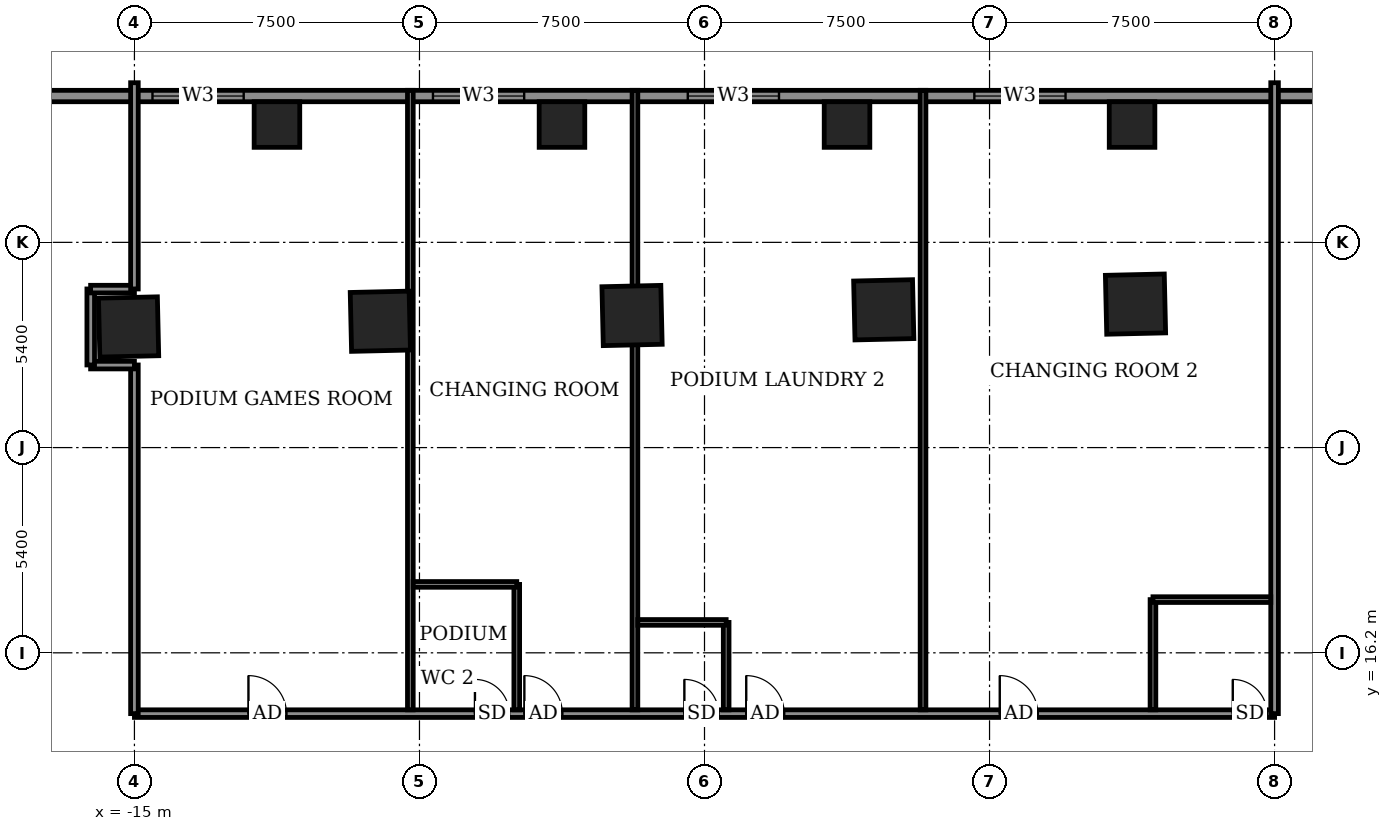
"""IFC4 building model, lengths in metres.
Left out: names, types, materials, properties, quantities, classifications, styles, units other than length and angle.
Written with IfcOpenShell. Run it as: python <this file> out.ifc"""

import sys

from ifc_helpers import new_model, si_unit, direction, frame, frame_2d, origin, origin_2d, place, context, subcontext, project, spatial, rectangle, extrude, element, fill, save


model = new_model("IFC4")
c1 = context("Model", 3, precision=1e-05, world=origin(), true_north=direction((0.0, 1.0)))
c2 = subcontext(c1, "Body", "Model", "MODEL_VIEW")
j1 = project(units=[si_unit("LENGTHUNIT", "METRE"), si_unit("PLANEANGLEUNIT", "RADIAN")], contexts=[c1])
p1 = place(None, origin())
s1 = spatial("IfcSite", under=j1, at=p1, CompositionType="ELEMENT")
p2 = place(p1, origin())
s2 = spatial("IfcBuilding", under=s1, at=p2, CompositionType="ELEMENT")
p3 = place(p2, frame((0.0, 0.0, 16.0)))
s3 = spatial("IfcBuildingStorey", under=s2, at=p3, CompositionType="ELEMENT", Elevation=16.0)
for number, where, z_axis, x_axis in (
    (1, (11.341, 25.375, -0.55), (0.0, 0.0, 1.0), (-1.0, -0.023, 0.0)),
    (2, (4.717, 25.225, -0.55), (0.0, 0.0, 1.0), (-1.0, -0.023, 0.0)),
    (3, (-1.906, 25.075, -0.55), (0.0, 0.0, 1.0), (-1.0, -0.023, 0.0)),
    (4, (-8.529, 24.924, -0.55), (0.0, 0.0, 1.0), (-1.0, -0.023, 0.0)),
    (5, (-15.154, 24.774, -0.55), (0.0, 0.0, 1.0), (-1.0, -0.023, 0.0)),
):
    element("IfcColumn", number, at=place(p3, frame(where, z_axis=z_axis, x_axis=x_axis)), inside=s3, PredefinedType="COLUMN", context=c2, shape_type="SweptSolid", body=[
        extrude(rectangle(XDim=1.55, YDim=1.55, at=origin_2d()), origin(), (0.0, 0.0, 1.0), 4.5),
    ])
for number, where, z_axis, x_axis in (
    (6, (-11.25, 30.1, -0.55), (0.0, 0.0, 1.0), (1.0, 0.0, 0.0)),
    (7, (-3.75, 30.1, -0.55), (0.0, 0.0, 1.0), (1.0, 0.0, 0.0)),
    (8, (3.75, 30.1, -0.55), (0.0, 0.0, 1.0), (1.0, 0.0, 0.0)),
    (9, (11.25, 30.1, -0.55), (0.0, 0.0, 1.0), (1.0, 0.0, 0.0)),
):
    element("IfcColumn", number, at=place(p3, frame(where, z_axis=z_axis, x_axis=x_axis)), inside=s3, PredefinedType="COLUMN", context=c2, shape_type="SweptSolid", body=[
        extrude(rectangle(XDim=1.2, YDim=1.2, at=origin_2d()), origin(), (0.0, 0.0, 1.0), 4.5),
    ])
p4 = place(p3, frame((28.138, 30.85, 0.0), z_axis=(0.0, 0.0, 1.0), x_axis=(-1.0, 0.0, 0.0)))
e10 = element("IfcWall", 10, at=p4, inside=s3, PredefinedType="SOLIDWALL", context=c2, shape_type="SweptSolid", body=[
    extrude(rectangle(XDim=56.276, YDim=0.3, at=frame_2d((28.138, 0.0))), origin(), (0.0, 0.0, 1.0), 3.95),
])
p5 = place(p4, frame((5.688, 0.0, 0.9)))
e11 = element("IfcOpeningElement", 11, at=p5, cuts=e10, PredefinedType="OPENING", context=c2, shape_type="SweptSolid", body=[
    extrude(rectangle(XDim=2.4, YDim=1.8, at=frame_2d((1.2, 0.9))), frame((0.0, 0.16, 0.0), z_axis=(0.0, -1.0, 0.0), x_axis=(1.0, 0.0, 0.0)), (0.0, 0.0, 1.0), 0.32),
])
p6 = place(p4, frame((18.638, 0.0, 0.9)))
e12 = element("IfcOpeningElement", 12, at=p6, cuts=e10, PredefinedType="OPENING", context=c2, shape_type="SweptSolid", body=[
    extrude(rectangle(XDim=2.4, YDim=1.8, at=frame_2d((1.2, 0.9))), frame((0.0, 0.16, 0.0), z_axis=(0.0, -1.0, 0.0), x_axis=(1.0, 0.0, 0.0)), (0.0, 0.0, 1.0), 0.32),
])
p7 = place(p4, frame((26.178, 0.0, 0.9)))
e13 = element("IfcOpeningElement", 13, at=p7, cuts=e10, PredefinedType="OPENING", context=c2, shape_type="SweptSolid", body=[
    extrude(rectangle(XDim=2.4, YDim=1.8, at=frame_2d((1.2, 0.9))), frame((0.0, 0.16, 0.0), z_axis=(0.0, -1.0, 0.0), x_axis=(1.0, 0.0, 0.0)), (0.0, 0.0, 1.0), 0.32),
])
p8 = place(p4, frame((32.883, 0.0, 0.9)))
e14 = element("IfcOpeningElement", 14, at=p8, cuts=e10, PredefinedType="OPENING", context=c2, shape_type="SweptSolid", body=[
    extrude(rectangle(XDim=2.4, YDim=1.8, at=frame_2d((1.2, 0.9))), frame((0.0, 0.16, 0.0), z_axis=(0.0, -1.0, 0.0), x_axis=(1.0, 0.0, 0.0)), (0.0, 0.0, 1.0), 0.32),
])
p9 = place(p4, frame((40.263, 0.0, 0.9)))
e15 = element("IfcOpeningElement", 15, at=p9, cuts=e10, PredefinedType="OPENING", context=c2, shape_type="SweptSolid", body=[
    extrude(rectangle(XDim=2.4, YDim=1.8, at=frame_2d((1.2, 0.9))), frame((0.0, 0.16, 0.0), z_axis=(0.0, -1.0, 0.0), x_axis=(1.0, 0.0, 0.0)), (0.0, 0.0, 1.0), 0.32),
])
p10 = place(p4, frame((53.488, 0.0, 0.9)))
e16 = element("IfcOpeningElement", 16, at=p10, cuts=e10, PredefinedType="OPENING", context=c2, shape_type="SweptSolid", body=[
    extrude(rectangle(XDim=2.4, YDim=1.8, at=frame_2d((1.2, 0.9))), frame((0.0, 0.16, 0.0), z_axis=(0.0, -1.0, 0.0), x_axis=(1.0, 0.0, 0.0)), (0.0, 0.0, 1.0), 0.32),
])
p11 = place(p3, frame((-15.0, 14.6, 0.0), z_axis=(0.0, 0.0, 1.0), x_axis=(1.0, 0.0, 0.0)))
e17 = element("IfcWall", 17, at=p11, inside=s3, PredefinedType="PARTITIONING", context=c2, shape_type="SweptSolid", body=[
    extrude(rectangle(XDim=30.0, YDim=0.2, at=frame_2d((15.0, 0.0))), origin(), (0.0, 0.0, 1.0), 3.95),
])
p12 = place(p11, frame((3.0, 0.0, 0.0)))
e18 = element("IfcOpeningElement", 18, at=p12, cuts=e17, PredefinedType="OPENING", context=c2, shape_type="SweptSolid", body=[
    extrude(rectangle(XDim=1.0, YDim=2.1, at=frame_2d((0.5, 1.05))), frame((0.0, 0.11, 0.0), z_axis=(0.0, -1.0, 0.0), x_axis=(1.0, 0.0, 0.0)), (0.0, 0.0, 1.0), 0.22),
])
p13 = place(p11, frame((10.26, 0.0, 0.0)))
e19 = element("IfcOpeningElement", 19, at=p13, cuts=e17, PredefinedType="OPENING", context=c2, shape_type="SweptSolid", body=[
    extrude(rectangle(XDim=1.0, YDim=2.1, at=frame_2d((0.5, 1.05))), frame((0.0, 0.11, 0.0), z_axis=(0.0, -1.0, 0.0), x_axis=(1.0, 0.0, 0.0)), (0.0, 0.0, 1.0), 0.22),
])
p14 = place(p11, frame((8.96, 0.0, 0.0)))
e20 = element("IfcOpeningElement", 20, at=p14, cuts=e17, PredefinedType="OPENING", context=c2, shape_type="SweptSolid", body=[
    extrude(rectangle(XDim=0.9, YDim=2.1, at=frame_2d((0.45, 1.05))), frame((0.0, 0.11, 0.0), z_axis=(0.0, -1.0, 0.0), x_axis=(1.0, 0.0, 0.0)), (0.0, 0.0, 1.0), 0.22),
])
p15 = place(p11, frame((16.098, 0.0, 0.0)))
e21 = element("IfcOpeningElement", 21, at=p15, cuts=e17, PredefinedType="OPENING", context=c2, shape_type="SweptSolid", body=[
    extrude(rectangle(XDim=1.0, YDim=2.1, at=frame_2d((0.5, 1.05))), frame((0.0, 0.11, 0.0), z_axis=(0.0, -1.0, 0.0), x_axis=(1.0, 0.0, 0.0)), (0.0, 0.0, 1.0), 0.22),
])
p16 = place(p11, frame((14.47, 0.0, 0.0)))
e22 = element("IfcOpeningElement", 22, at=p16, cuts=e17, PredefinedType="OPENING", context=c2, shape_type="SweptSolid", body=[
    extrude(rectangle(XDim=0.9, YDim=2.1, at=frame_2d((0.45, 1.05))), frame((0.0, 0.11, 0.0), z_axis=(0.0, -1.0, 0.0), x_axis=(1.0, 0.0, 0.0)), (0.0, 0.0, 1.0), 0.22),
])
p17 = place(p11, frame((22.769, 0.0, 0.0)))
e23 = element("IfcOpeningElement", 23, at=p17, cuts=e17, PredefinedType="OPENING", context=c2, shape_type="SweptSolid", body=[
    extrude(rectangle(XDim=1.0, YDim=2.1, at=frame_2d((0.5, 1.05))), frame((0.0, 0.11, 0.0), z_axis=(0.0, -1.0, 0.0), x_axis=(1.0, 0.0, 0.0)), (0.0, 0.0, 1.0), 0.22),
])
p18 = place(p11, frame((28.9, 0.0, 0.0)))
e24 = element("IfcOpeningElement", 24, at=p18, cuts=e17, PredefinedType="OPENING", context=c2, shape_type="SweptSolid", body=[
    extrude(rectangle(XDim=0.9, YDim=2.1, at=frame_2d((0.45, 1.05))), frame((0.0, 0.11, 0.0), z_axis=(0.0, -1.0, 0.0), x_axis=(1.0, 0.0, 0.0)), (0.0, 0.0, 1.0), 0.22),
])
p19 = place(p3, frame((-15.0, 14.6, 0.0), z_axis=(0.0, 0.0, 1.0), x_axis=(0.0, 1.0, 0.0)))
e25 = element("IfcWall", 25, at=p19, inside=s3, PredefinedType="PARTITIONING", context=c2, shape_type="SweptSolid", body=[
    extrude(rectangle(XDim=9.174, YDim=0.2, at=frame_2d((4.587, 0.0))), origin(), (0.0, 0.0, 1.0), 3.95),
])
p20 = place(p3, frame((-7.74, 14.7, 0.0), z_axis=(0.0, 0.0, 1.0), x_axis=(0.0, 1.0, 0.0)))
e26 = element("IfcWall", 26, at=p20, inside=s3, PredefinedType="PARTITIONING", context=c2, shape_type="SweptSolid", body=[
    extrude(rectangle(XDim=16.3, YDim=0.15, at=frame_2d((8.15, 0.0))), origin(), (0.0, 0.0, 1.0), 3.95),
])
p21 = place(p3, frame((-4.94, 14.7, 0.0), z_axis=(0.0, 0.0, 1.0), x_axis=(0.0, 1.0, 0.0)))
e27 = element("IfcWall", 27, at=p21, inside=s3, PredefinedType="PARTITIONING", context=c2, shape_type="SweptSolid", body=[
    extrude(rectangle(XDim=3.3, YDim=0.15, at=frame_2d((1.65, 0.0))), origin(), (0.0, 0.0, 1.0), 3.95),
])
p22 = place(p3, frame((-1.83, 14.7, 0.0), z_axis=(0.0, 0.0, 1.0), x_axis=(0.0, 1.0, 0.0)))
e28 = element("IfcWall", 28, at=p22, inside=s3, PredefinedType="PARTITIONING", context=c2, shape_type="SweptSolid", body=[
    extrude(rectangle(XDim=16.3, YDim=0.15, at=frame_2d((8.15, 0.0))), origin(), (0.0, 0.0, 1.0), 3.95),
])
p23 = place(p3, frame((0.57, 14.7, 0.0), z_axis=(0.0, 0.0, 1.0), x_axis=(0.0, 1.0, 0.0)))
e29 = element("IfcWall", 29, at=p23, inside=s3, PredefinedType="PARTITIONING", context=c2, shape_type="SweptSolid", body=[
    extrude(rectangle(XDim=2.3, YDim=0.15, at=frame_2d((1.15, 0.0))), origin(), (0.0, 0.0, 1.0), 3.95),
])
p24 = place(p3, frame((5.75, 14.7, 0.0), z_axis=(0.0, 0.0, 1.0), x_axis=(0.0, 1.0, 0.0)))
e30 = element("IfcWall", 30, at=p24, inside=s3, PredefinedType="PARTITIONING", context=c2, shape_type="SweptSolid", body=[
    extrude(rectangle(XDim=16.3, YDim=0.15, at=frame_2d((8.15, 0.0))), origin(), (0.0, 0.0, 1.0), 3.95),
])
p25 = place(p3, frame((11.8, 14.7, 0.0), z_axis=(0.0, 0.0, 1.0), x_axis=(0.0, 1.0, 0.0)))
e31 = element("IfcWall", 31, at=p25, inside=s3, PredefinedType="PARTITIONING", context=c2, shape_type="SweptSolid", body=[
    extrude(rectangle(XDim=2.9, YDim=0.15, at=frame_2d((1.45, 0.0))), origin(), (0.0, 0.0, 1.0), 3.95),
])
p26 = place(p3, frame((15.0, 14.6, 0.0), z_axis=(0.0, 0.0, 1.0), x_axis=(0.0, 1.0, 0.0)))
e32 = element("IfcWall", 32, at=p26, inside=s3, PredefinedType="PARTITIONING", context=c2, shape_type="SweptSolid", body=[
    extrude(rectangle(XDim=16.6, YDim=0.2, at=frame_2d((8.3, 0.0))), origin(), (0.0, 0.0, 1.0), 3.95),
])
p27 = place(p3, frame((-1.755, 17.0, 0.0), z_axis=(0.0, 0.0, 1.0), x_axis=(1.0, 0.0, 0.0)))
e33 = element("IfcWall", 33, at=p27, inside=s3, PredefinedType="PARTITIONING", context=c2, shape_type="SweptSolid", body=[
    extrude(rectangle(XDim=2.325, YDim=0.15, at=frame_2d((1.163, 0.0))), origin(), (0.0, 0.0, 1.0), 3.95),
])
p28 = place(p3, frame((11.8, 17.6, 0.0), z_axis=(0.0, 0.0, 1.0), x_axis=(1.0, 0.0, 0.0)))
e34 = element("IfcWall", 34, at=p28, inside=s3, PredefinedType="PARTITIONING", context=c2, shape_type="SweptSolid", body=[
    extrude(rectangle(XDim=3.1, YDim=0.15, at=frame_2d((1.55, 0.0))), origin(), (0.0, 0.0, 1.0), 3.95),
])
p29 = place(p3, frame((-7.665, 18.0, 0.0), z_axis=(0.0, 0.0, 1.0), x_axis=(1.0, 0.0, 0.0)))
e35 = element("IfcWall", 35, at=p29, inside=s3, PredefinedType="PARTITIONING", context=c2, shape_type="SweptSolid", body=[
    extrude(rectangle(XDim=2.725, YDim=0.15, at=frame_2d((1.363, 0.0))), origin(), (0.0, 0.0, 1.0), 3.95),
])
p30 = place(p3, frame((-16.153, 23.77, 0.0), z_axis=(0.0, 0.0, 1.0), x_axis=(1.0, 0.0, 0.0)))
e36 = element("IfcWall", 36, at=p30, inside=s3, PredefinedType="PARTITIONING", context=c2, shape_type="SweptSolid", body=[
    extrude(rectangle(XDim=1.153, YDim=0.2, at=frame_2d((0.577, 0.0))), origin(), (0.0, 0.0, 1.0), 3.95),
])
p31 = place(p3, frame((-16.15, 23.774, 0.0), z_axis=(0.0, 0.0, 1.0), x_axis=(0.0, 1.0, 0.0)))
e37 = element("IfcWall", 37, at=p31, inside=s3, PredefinedType="PARTITIONING", context=c2, shape_type="SweptSolid", body=[
    extrude(rectangle(XDim=2.0, YDim=0.2, at=frame_2d((1.0, 0.0))), origin(), (0.0, 0.0, 1.0), 3.95),
])
p32 = place(p3, frame((-16.153, 25.77, 0.0), z_axis=(0.0, 0.0, 1.0), x_axis=(1.0, 0.0, 0.0)))
e38 = element("IfcWall", 38, at=p32, inside=s3, PredefinedType="PARTITIONING", context=c2, shape_type="SweptSolid", body=[
    extrude(rectangle(XDim=1.153, YDim=0.2, at=frame_2d((0.577, 0.0))), origin(), (0.0, 0.0, 1.0), 3.95),
])
p33 = place(p3, frame((-15.0, 25.774, 0.0), z_axis=(0.0, 0.0, 1.0), x_axis=(0.0, 1.0, 0.0)))
e39 = element("IfcWall", 39, at=p33, inside=s3, PredefinedType="PARTITIONING", context=c2, shape_type="SweptSolid", body=[
    extrude(rectangle(XDim=5.426, YDim=0.2, at=frame_2d((2.713, 0.0))), origin(), (0.0, 0.0, 1.0), 3.95),
])
p34 = place(p6, origin())
e40 = element("IfcWindow", 40, at=p34, inside=s3, PartitioningType="DOUBLE_PANEL_VERTICAL", PredefinedType="WINDOW", context=c2, shape_type="SweptSolid", body=[
    extrude(rectangle(XDim=2.4, YDim=1.8, at=frame_2d((1.2, 0.9))), frame((0.0, 0.03, 0.0), z_axis=(0.0, -1.0, 0.0), x_axis=(1.0, 0.0, 0.0)), (0.0, 0.0, 1.0), 0.06),
])
fill(e12, e40)
p35 = place(p7, origin())
e41 = element("IfcWindow", 41, at=p35, inside=s3, PartitioningType="DOUBLE_PANEL_VERTICAL", PredefinedType="WINDOW", context=c2, shape_type="SweptSolid", body=[
    extrude(rectangle(XDim=2.4, YDim=1.8, at=frame_2d((1.2, 0.9))), frame((0.0, 0.03, 0.0), z_axis=(0.0, -1.0, 0.0), x_axis=(1.0, 0.0, 0.0)), (0.0, 0.0, 1.0), 0.06),
])
fill(e13, e41)
p36 = place(p8, origin())
e42 = element("IfcWindow", 42, at=p36, inside=s3, PartitioningType="DOUBLE_PANEL_VERTICAL", PredefinedType="WINDOW", context=c2, shape_type="SweptSolid", body=[
    extrude(rectangle(XDim=2.4, YDim=1.8, at=frame_2d((1.2, 0.9))), frame((0.0, 0.03, 0.0), z_axis=(0.0, -1.0, 0.0), x_axis=(1.0, 0.0, 0.0)), (0.0, 0.0, 1.0), 0.06),
])
fill(e14, e42)
p37 = place(p9, origin())
e43 = element("IfcWindow", 43, at=p37, inside=s3, PartitioningType="DOUBLE_PANEL_VERTICAL", PredefinedType="WINDOW", context=c2, shape_type="SweptSolid", body=[
    extrude(rectangle(XDim=2.4, YDim=1.8, at=frame_2d((1.2, 0.9))), frame((0.0, 0.03, 0.0), z_axis=(0.0, -1.0, 0.0), x_axis=(1.0, 0.0, 0.0)), (0.0, 0.0, 1.0), 0.06),
])
fill(e15, e43)
p38 = place(p12, origin())
e44 = element("IfcDoor", 44, at=p38, inside=s3, OperationType="SINGLE_SWING_RIGHT", PredefinedType="DOOR", context=c2, shape_type="SweptSolid", body=[
    extrude(rectangle(XDim=1.0, YDim=2.1, at=frame_2d((0.5, 1.05))), frame((0.0, 0.025, 0.0), z_axis=(0.0, -1.0, 0.0), x_axis=(1.0, 0.0, 0.0)), (0.0, 0.0, 1.0), 0.05),
])
fill(e18, e44)
p39 = place(p13, origin())
e45 = element("IfcDoor", 45, at=p39, inside=s3, OperationType="SINGLE_SWING_LEFT", PredefinedType="DOOR", context=c2, shape_type="SweptSolid", body=[
    extrude(rectangle(XDim=1.0, YDim=2.1, at=frame_2d((0.5, 1.05))), frame((0.0, 0.025, 0.0), z_axis=(0.0, -1.0, 0.0), x_axis=(1.0, 0.0, 0.0)), (0.0, 0.0, 1.0), 0.05),
])
fill(e19, e45)
p40 = place(p14, origin())
e46 = element("IfcDoor", 46, at=p40, inside=s3, OperationType="SINGLE_SWING_RIGHT", PredefinedType="DOOR", context=c2, shape_type="SweptSolid", body=[
    extrude(rectangle(XDim=0.9, YDim=2.1, at=frame_2d((0.45, 1.05))), frame((0.0, 0.025, 0.0), z_axis=(0.0, -1.0, 0.0), x_axis=(1.0, 0.0, 0.0)), (0.0, 0.0, 1.0), 0.05),
])
fill(e20, e46)
p41 = place(p15, origin())
e47 = element("IfcDoor", 47, at=p41, inside=s3, OperationType="SINGLE_SWING_RIGHT", PredefinedType="DOOR", context=c2, shape_type="SweptSolid", body=[
    extrude(rectangle(XDim=1.0, YDim=2.1, at=frame_2d((0.5, 1.05))), frame((0.0, 0.025, 0.0), z_axis=(0.0, -1.0, 0.0), x_axis=(1.0, 0.0, 0.0)), (0.0, 0.0, 1.0), 0.05),
])
fill(e21, e47)
p42 = place(p16, origin())
e48 = element("IfcDoor", 48, at=p42, inside=s3, OperationType="SINGLE_SWING_LEFT", PredefinedType="DOOR", context=c2, shape_type="SweptSolid", body=[
    extrude(rectangle(XDim=0.9, YDim=2.1, at=frame_2d((0.45, 1.05))), frame((0.0, 0.025, 0.0), z_axis=(0.0, -1.0, 0.0), x_axis=(1.0, 0.0, 0.0)), (0.0, 0.0, 1.0), 0.05),
])
fill(e22, e48)
p43 = place(p17, origin())
e49 = element("IfcDoor", 49, at=p43, inside=s3, OperationType="SINGLE_SWING_LEFT", PredefinedType="DOOR", context=c2, shape_type="SweptSolid", body=[
    extrude(rectangle(XDim=1.0, YDim=2.1, at=frame_2d((0.5, 1.05))), frame((0.0, 0.025, 0.0), z_axis=(0.0, -1.0, 0.0), x_axis=(1.0, 0.0, 0.0)), (0.0, 0.0, 1.0), 0.05),
])
fill(e23, e49)
p44 = place(p18, origin())
e50 = element("IfcDoor", 50, at=p44, inside=s3, OperationType="SINGLE_SWING_RIGHT", PredefinedType="DOOR", context=c2, shape_type="SweptSolid", body=[
    extrude(rectangle(XDim=0.9, YDim=2.1, at=frame_2d((0.45, 1.05))), frame((0.0, 0.025, 0.0), z_axis=(0.0, -1.0, 0.0), x_axis=(1.0, 0.0, 0.0)), (0.0, 0.0, 1.0), 0.05),
])
fill(e24, e50)
save(model, sys.argv[1])
